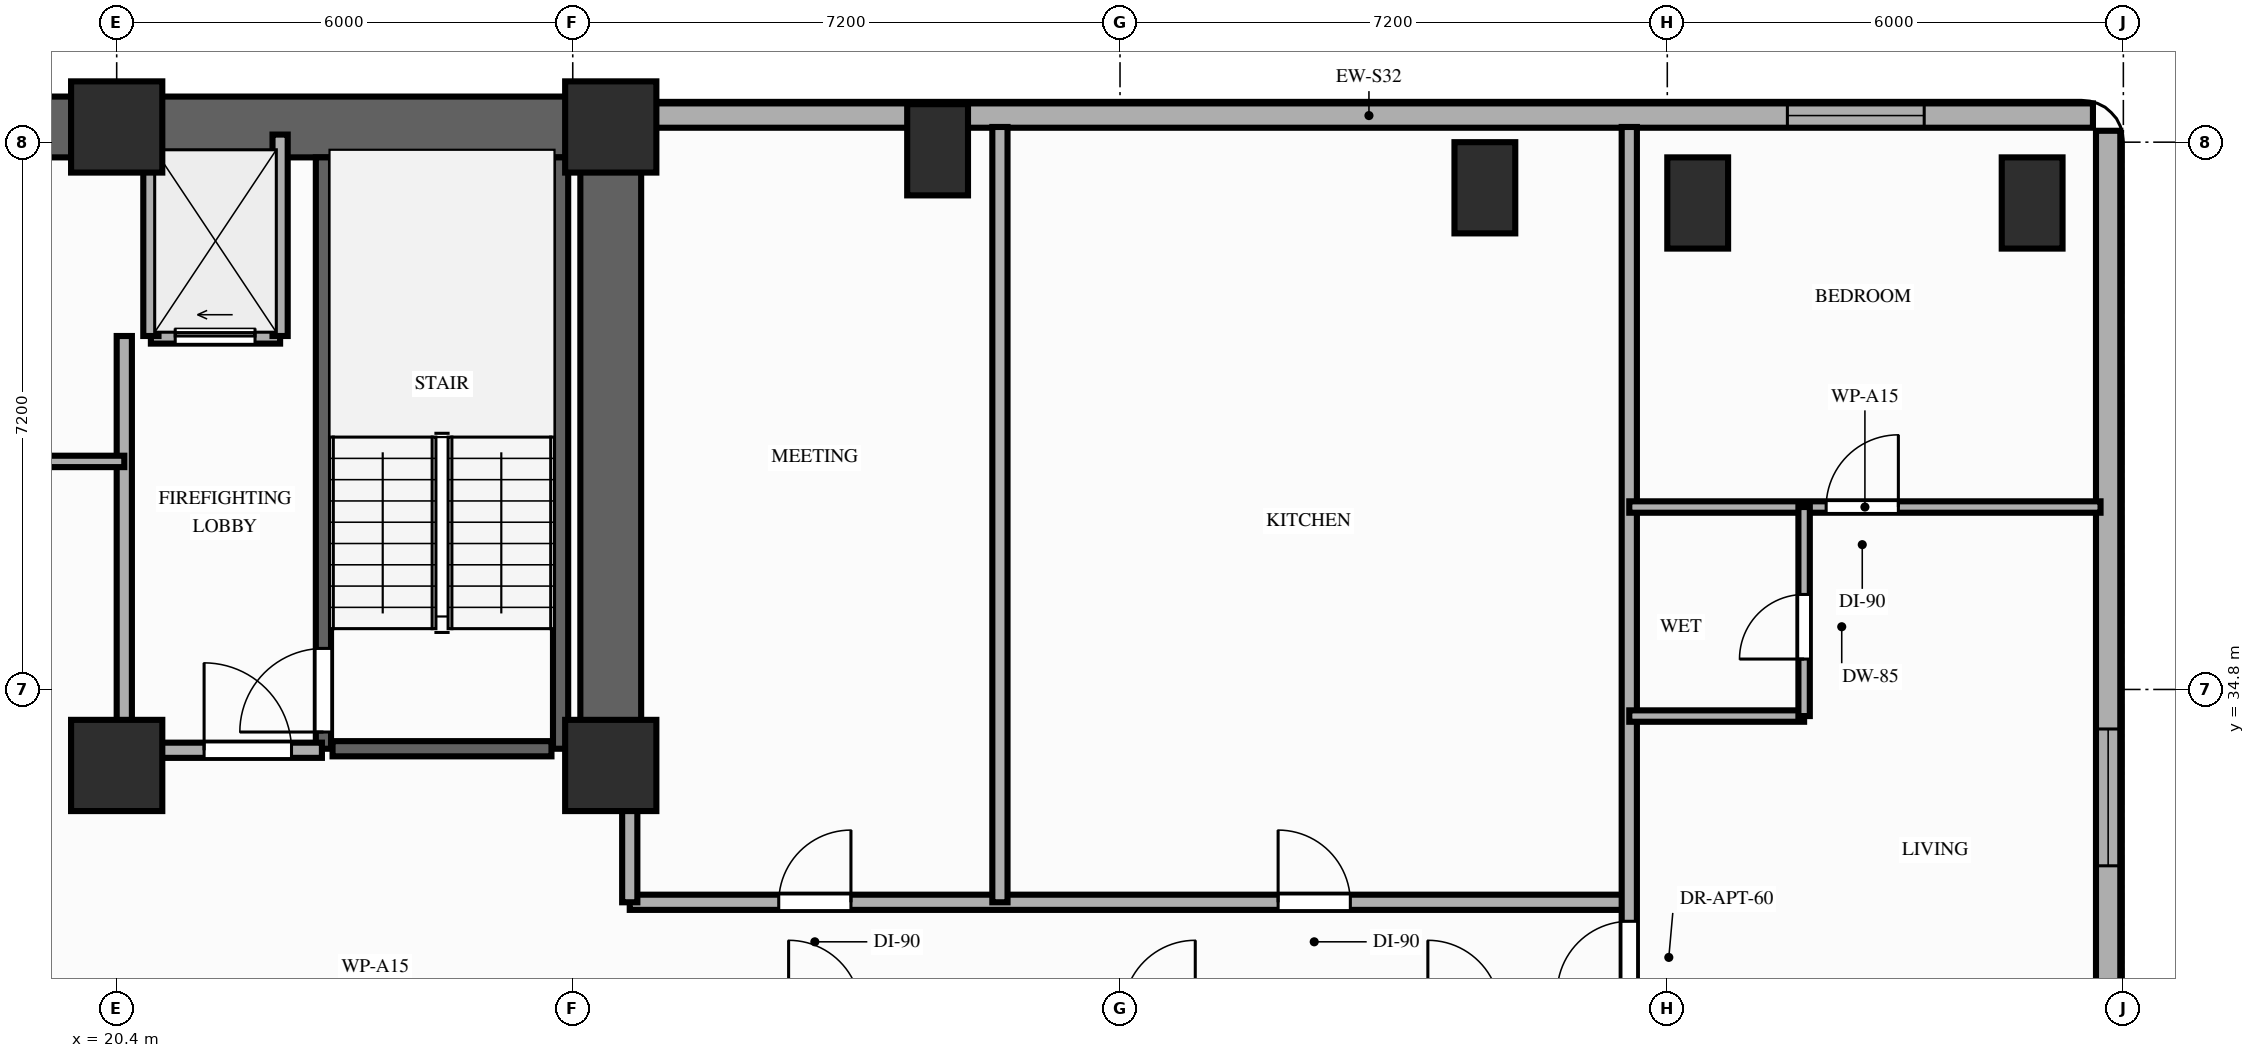
"""IFC4 building model, lengths in metres.
Left out: names, types, materials, properties, quantities, classifications, styles, units other than length and angle.
Written with IfcOpenShell. Run it as: python <this file> out.ifc"""

import sys

from ifc_helpers import new_model, si_unit, direction, frame, frame_2d, origin, origin_2d, place, context, subcontext, project, spatial, rectangle, extrude, element, fill, save


model = new_model("IFC4")
c1 = context("Model", 3, precision=1e-05, world=origin(), true_north=direction((0.0, 1.0)))
c2 = subcontext(c1, "Body", "Model", "MODEL_VIEW")
j1 = project(units=[si_unit("LENGTHUNIT", "METRE"), si_unit("PLANEANGLEUNIT", "RADIAN")], contexts=[c1])
p1 = place(None, origin())
s1 = spatial("IfcSite", under=j1, at=p1, CompositionType="ELEMENT")
p2 = place(p1, origin())
s2 = spatial("IfcBuilding", under=s1, at=p2, CompositionType="ELEMENT")
p3 = place(p2, frame((0.0, 0.0, 89.8)))
s3 = spatial("IfcBuildingStorey", under=s2, at=p3, CompositionType="ELEMENT", Elevation=89.8)
for number, where, z_axis, x_axis in (
    (1, (20.4, 33.8, 0.0), (0.0, 0.0, 1.0), (1.0, 0.0, 0.0)),
    (2, (26.9, 33.8, 0.0), (0.0, 0.0, 1.0), (1.0, 0.0, 0.0)),
    (3, (20.4, 42.2, 0.0), (0.0, 0.0, 1.0), (1.0, 0.0, 0.0)),
    (4, (26.9, 42.2, 0.0), (0.0, 0.0, 1.0), (1.0, 0.0, 0.0)),
):
    element("IfcColumn", number, at=place(p3, frame(where, z_axis=z_axis, x_axis=x_axis)), inside=s3, PredefinedType="COLUMN", context=c2, shape_type="SweptSolid", body=[
        extrude(rectangle(XDim=1.2, YDim=1.2, at=origin_2d()), origin(), (0.0, 0.0, 1.0), 3.2),
    ])
for number, where, z_axis, x_axis in (
    (5, (31.2, 41.9, 0.0), (0.0, 0.0, 1.0), (1.0, 0.0, 0.0)),
    (6, (38.4, 41.4, 0.0), (0.0, 0.0, 1.0), (1.0, 0.0, 0.0)),
    (7, (41.2, 41.2, 0.0), (0.0, 0.0, 1.0), (1.0, 0.0, 0.0)),
    (8, (45.6, 41.2, 0.0), (0.0, 0.0, 1.0), (1.0, 0.0, 0.0)),
):
    element("IfcColumn", number, at=place(p3, frame(where, z_axis=z_axis, x_axis=x_axis)), inside=s3, PredefinedType="COLUMN", context=c2, shape_type="SweptSolid", body=[
        extrude(rectangle(XDim=0.8, YDim=1.2, at=origin_2d()), origin(), (0.0, 0.0, 1.0), 3.2),
    ])
p4 = place(p3, frame((46.4, 42.35, 0.0), z_axis=(0.0, 0.0, 1.0), x_axis=(-1.0, 0.0, 0.0)))
e9 = element("IfcWall", 9, at=p4, inside=s3, PredefinedType="STANDARD", context=c2, shape_type="SweptSolid", body=[
    extrude(rectangle(XDim=19.05, YDim=0.32, at=frame_2d((9.525, 0.0))), origin(), (0.0, 0.0, 1.0), 2.4),
])
p5 = place(p4, frame((2.22, 0.0, 0.85)))
e10 = element("IfcOpeningElement", 10, at=p5, cuts=e9, PredefinedType="OPENING", context=c2, shape_type="SweptSolid", body=[
    extrude(rectangle(XDim=1.8, YDim=1.3, at=frame_2d((0.9, 0.65))), frame((0.0, 0.17, 0.0), z_axis=(0.0, -1.0, 0.0), x_axis=(1.0, 0.0, 0.0)), (0.0, 0.0, 1.0), 0.34),
])
p6 = place(p3, frame((46.6, 26.8, 0.0), z_axis=(0.0, 0.0, 1.0), x_axis=(0.0, 1.0, 0.0)))
e11 = element("IfcWall", 11, at=p6, inside=s3, PredefinedType="STANDARD", context=c2, shape_type="SweptSolid", body=[
    extrude(rectangle(XDim=15.35, YDim=0.32, at=frame_2d((7.675, 0.0))), origin(), (0.0, 0.0, 1.0), 3.02),
])
p7 = place(p6, frame((5.68, 0.0, 0.85)))
e12 = element("IfcOpeningElement", 12, at=p7, cuts=e11, PredefinedType="OPENING", context=c2, shape_type="SweptSolid", body=[
    extrude(rectangle(XDim=1.8, YDim=1.75, at=frame_2d((0.9, 0.875))), frame((0.0, 0.17, 0.0), z_axis=(0.0, -1.0, 0.0), x_axis=(1.0, 0.0, 0.0)), (0.0, 0.0, 1.0), 0.34),
])
p8 = place(p3, frame((6.45, 42.2, 0.0), z_axis=(0.0, 0.0, 1.0), x_axis=(1.0, 0.0, 0.0)))
e13 = element("IfcWall", 13, at=p8, inside=s3, PredefinedType="SHEAR", context=c2, shape_type="SweptSolid", body=[
    extrude(rectangle(XDim=20.45, YDim=0.8, at=frame_2d((10.225, 0.0))), origin(), (0.0, 0.0, 1.0), 3.02),
])
p9 = place(p3, frame((26.9, 33.8, 0.0), z_axis=(0.0, 0.0, 1.0), x_axis=(0.0, 1.0, 0.0)))
e14 = element("IfcWall", 14, at=p9, inside=s3, PredefinedType="SHEAR", context=c2, shape_type="SweptSolid", body=[
    extrude(rectangle(XDim=7.95, YDim=0.8, at=frame_2d((3.975, 0.0))), origin(), (0.0, 0.0, 1.0), 3.02),
])
p10 = place(p3, frame((23.12, 34.02, 0.0), z_axis=(0.0, 0.0, 1.0), x_axis=(0.0, 1.0, 0.0)))
e15 = element("IfcWall", 15, at=p10, inside=s3, PredefinedType="SHEAR", context=c2, shape_type="SweptSolid", body=[
    extrude(rectangle(XDim=7.78, YDim=0.2, at=frame_2d((3.89, 0.0))), origin(), (0.0, 0.0, 1.0), 3.02),
])
p11 = place(p10, frame((0.22, 0.0, 0.0)))
e16 = element("IfcOpeningElement", 16, at=p11, cuts=e15, PredefinedType="OPENING", context=c2, shape_type="SweptSolid", body=[
    extrude(rectangle(XDim=1.1, YDim=2.15, at=frame_2d((0.55, 1.075))), frame((0.0, 0.11, 0.0), z_axis=(0.0, -1.0, 0.0), x_axis=(1.0, 0.0, 0.0)), (0.0, 0.0, 1.0), 0.22),
])
p12 = place(p3, frame((26.24, 34.02, 0.0), z_axis=(0.0, 0.0, 1.0), x_axis=(0.0, 1.0, 0.0)))
e17 = element("IfcWall", 17, at=p12, inside=s3, PredefinedType="SHEAR", context=c2, shape_type="SweptSolid", body=[
    extrude(rectangle(XDim=7.78, YDim=0.2, at=frame_2d((3.89, 0.0))), origin(), (0.0, 0.0, 1.0), 3.02),
])
p13 = place(p3, frame((23.24, 34.02, 0.0), z_axis=(0.0, 0.0, 1.0), x_axis=(1.0, 0.0, 0.0)))
e18 = element("IfcWall", 18, at=p13, inside=s3, PredefinedType="SHEAR", context=c2, shape_type="SweptSolid", body=[
    extrude(rectangle(XDim=2.88, YDim=0.2, at=frame_2d((1.44, 0.0))), origin(), (0.0, 0.0, 1.0), 3.02),
])
p14 = place(p3, frame((20.85, 39.45, 0.0), z_axis=(0.0, 0.0, 1.0), x_axis=(1.0, 0.0, 0.0)))
e19 = element("IfcWall", 19, at=p14, inside=s3, PredefinedType="MOVABLE", context=c2, shape_type="SweptSolid", body=[
    extrude(rectangle(XDim=1.7, YDim=0.2, at=frame_2d((0.85, 0.0))), origin(), (0.0, 0.0, 1.0), 3.02),
])
p15 = place(p14, frame((0.32, 0.0, 0.0)))
e20 = element("IfcOpeningElement", 20, at=p15, cuts=e19, PredefinedType="OPENING", context=c2, shape_type="SweptSolid", body=[
    extrude(rectangle(XDim=1.05, YDim=2.15, at=frame_2d((0.525, 1.075))), frame((0.0, 0.11, 0.0), z_axis=(0.0, -1.0, 0.0), x_axis=(1.0, 0.0, 0.0)), (0.0, 0.0, 1.0), 0.22),
])
for number, where, z_axis, x_axis in (
    (21, (20.85, 39.45, 0.0), (0.0, 0.0, 1.0), (0.0, 1.0, 0.0)),
    (22, (22.55, 39.45, 0.0), (0.0, 0.0, 1.0), (0.0, 1.0, 0.0)),
):
    element("IfcWall", number, at=place(p3, frame(where, z_axis=z_axis, x_axis=x_axis)), inside=s3, PredefinedType="MOVABLE", context=c2, shape_type="SweptSolid", body=[
        extrude(rectangle(XDim=2.65, YDim=0.2, at=frame_2d((1.325, 0.0))), origin(), (0.0, 0.0, 1.0), 2.4),
    ])
p16 = place(p3, frame((20.5, 34.0, 0.0), z_axis=(0.0, 0.0, 1.0), x_axis=(0.0, 1.0, 0.0)))
e23 = element("IfcWall", 23, at=p16, inside=s3, PredefinedType="PARTITIONING", context=c2, shape_type="SweptSolid", body=[
    extrude(rectangle(XDim=5.45, YDim=0.2, at=frame_2d((2.725, 0.0))), origin(), (0.0, 0.0, 1.0), 2.4),
])
p17 = place(p3, frame((20.5, 34.0, 0.0), z_axis=(0.0, 0.0, 1.0), x_axis=(1.0, 0.0, 0.0)))
e24 = element("IfcWall", 24, at=p17, inside=s3, PredefinedType="PARTITIONING", context=c2, shape_type="SweptSolid", body=[
    extrude(rectangle(XDim=2.6, YDim=0.2, at=frame_2d((1.3, 0.0))), origin(), (0.0, 0.0, 1.0), 2.4),
])
p18 = place(p17, frame((1.05, 0.0, 0.0)))
e25 = element("IfcOpeningElement", 25, at=p18, cuts=e24, PredefinedType="OPENING", context=c2, shape_type="SweptSolid", body=[
    extrude(rectangle(XDim=1.15, YDim=2.15, at=frame_2d((0.575, 1.075))), frame((0.0, 0.11, 0.0), z_axis=(0.0, -1.0, 0.0), x_axis=(1.0, 0.0, 0.0)), (0.0, 0.0, 1.0), 0.22),
])
p19 = place(p3, frame((12.9, 37.8, 0.0), z_axis=(0.0, 0.0, 1.0), x_axis=(1.0, 0.0, 0.0)))
e26 = element("IfcWall", 26, at=p19, inside=s3, PredefinedType="PARTITIONING", context=c2, shape_type="SweptSolid", body=[
    extrude(rectangle(XDim=7.6, YDim=0.15, at=frame_2d((3.8, 0.0))), origin(), (0.0, 0.0, 1.0), 3.02),
])
p20 = place(p19, frame((1.3, 0.0, 0.0)))
e27 = element("IfcOpeningElement", 27, at=p20, cuts=e26, PredefinedType="OPENING", context=c2, shape_type="SweptSolid", body=[
    extrude(rectangle(XDim=0.95, YDim=2.15, at=frame_2d((0.475, 1.075))), frame((0.0, 0.085, 0.0), z_axis=(0.0, -1.0, 0.0), x_axis=(1.0, 0.0, 0.0)), (0.0, 0.0, 1.0), 0.17),
])
p21 = place(p19, frame((5.1, 0.0, 0.0)))
e28 = element("IfcOpeningElement", 28, at=p21, cuts=e26, PredefinedType="OPENING", context=c2, shape_type="SweptSolid", body=[
    extrude(rectangle(XDim=0.95, YDim=2.15, at=frame_2d((0.475, 1.075))), frame((0.0, 0.085, 0.0), z_axis=(0.0, -1.0, 0.0), x_axis=(1.0, 0.0, 0.0)), (0.0, 0.0, 1.0), 0.17),
])
p22 = place(p3, frame((27.15, 32.0, 0.0), z_axis=(0.0, 0.0, 1.0), x_axis=(1.0, 0.0, 0.0)))
e29 = element("IfcWall", 29, at=p22, inside=s3, PredefinedType="PARTITIONING", context=c2, shape_type="SweptSolid", body=[
    extrude(rectangle(XDim=13.15, YDim=0.2, at=frame_2d((6.575, 0.0))), origin(), (0.0, 0.0, 1.0), 2.4),
])
p23 = place(p22, frame((1.96, 0.0, 0.0)))
e30 = element("IfcOpeningElement", 30, at=p23, cuts=e29, PredefinedType="OPENING", context=c2, shape_type="SweptSolid", body=[
    extrude(rectangle(XDim=0.95, YDim=2.15, at=frame_2d((0.475, 1.075))), frame((0.0, 0.11, 0.0), z_axis=(0.0, -1.0, 0.0), x_axis=(1.0, 0.0, 0.0)), (0.0, 0.0, 1.0), 0.22),
])
p24 = place(p22, frame((8.53, 0.0, 0.0)))
e31 = element("IfcOpeningElement", 31, at=p24, cuts=e29, PredefinedType="OPENING", context=c2, shape_type="SweptSolid", body=[
    extrude(rectangle(XDim=0.95, YDim=2.15, at=frame_2d((0.475, 1.075))), frame((0.0, 0.11, 0.0), z_axis=(0.0, -1.0, 0.0), x_axis=(1.0, 0.0, 0.0)), (0.0, 0.0, 1.0), 0.22),
])
p25 = place(p3, frame((27.15, 32.0, 0.0), z_axis=(0.0, 0.0, 1.0), x_axis=(0.0, 1.0, 0.0)))
e32 = element("IfcWall", 32, at=p25, inside=s3, PredefinedType="PARTITIONING", context=c2, shape_type="SweptSolid", body=[
    extrude(rectangle(XDim=1.68, YDim=0.2, at=frame_2d((0.84, 0.0))), origin(), (0.0, 0.0, 1.0), 2.4),
])
p26 = place(p3, frame((40.3, 26.75, 0.0), z_axis=(0.0, 0.0, 1.0), x_axis=(0.0, 1.0, 0.0)))
e33 = element("IfcWall", 33, at=p26, inside=s3, PredefinedType="PARTITIONING", context=c2, shape_type="SweptSolid", body=[
    extrude(rectangle(XDim=15.45, YDim=0.2, at=frame_2d((7.725, 0.0))), origin(), (0.0, 0.0, 1.0), 2.4),
])
p27 = place(p26, frame((4.05, 0.0, 0.0)))
e34 = element("IfcOpeningElement", 34, at=p27, cuts=e33, PredefinedType="OPENING", context=c2, shape_type="SweptSolid", body=[
    extrude(rectangle(XDim=0.95, YDim=2.15, at=frame_2d((0.475, 1.075))), frame((0.0, 0.11, 0.0), z_axis=(0.0, -1.0, 0.0), x_axis=(1.0, 0.0, 0.0)), (0.0, 0.0, 1.0), 0.22),
])
p28 = place(p3, frame((40.3, 37.2, 0.0), z_axis=(0.0, 0.0, 1.0), x_axis=(1.0, 0.0, 0.0)))
e35 = element("IfcWall", 35, at=p28, inside=s3, PredefinedType="PARTITIONING", context=c2, shape_type="SweptSolid", body=[
    extrude(rectangle(XDim=6.2, YDim=0.15, at=frame_2d((3.1, 0.0))), origin(), (0.0, 0.0, 1.0), 2.4),
])
p29 = place(p28, frame((2.59, 0.0, 0.0)))
e36 = element("IfcOpeningElement", 36, at=p29, cuts=e35, PredefinedType="OPENING", context=c2, shape_type="SweptSolid", body=[
    extrude(rectangle(XDim=0.95, YDim=2.15, at=frame_2d((0.475, 1.075))), frame((0.0, 0.085, 0.0), z_axis=(0.0, -1.0, 0.0), x_axis=(1.0, 0.0, 0.0)), (0.0, 0.0, 1.0), 0.17),
])
p30 = place(p3, frame((40.3, 34.45, 0.0), z_axis=(0.0, 0.0, 1.0), x_axis=(1.0, 0.0, 0.0)))
e37 = element("IfcWall", 37, at=p30, inside=s3, PredefinedType="PARTITIONING", context=c2, shape_type="SweptSolid", body=[
    extrude(rectangle(XDim=2.3, YDim=0.15, at=frame_2d((1.15, 0.0))), origin(), (0.0, 0.0, 1.0), 2.4),
])
p31 = place(p3, frame((42.6, 34.45, 0.0), z_axis=(0.0, 0.0, 1.0), x_axis=(0.0, 1.0, 0.0)))
e38 = element("IfcWall", 38, at=p31, inside=s3, PredefinedType="PARTITIONING", context=c2, shape_type="SweptSolid", body=[
    extrude(rectangle(XDim=2.75, YDim=0.15, at=frame_2d((1.375, 0.0))), origin(), (0.0, 0.0, 1.0), 2.61),
])
p32 = place(p31, frame((0.75, 0.0, 0.0)))
e39 = element("IfcOpeningElement", 39, at=p32, cuts=e38, PredefinedType="OPENING", context=c2, shape_type="SweptSolid", body=[
    extrude(rectangle(XDim=0.85, YDim=2.1, at=frame_2d((0.425, 1.05))), frame((0.0, 0.085, 0.0), z_axis=(0.0, -1.0, 0.0), x_axis=(1.0, 0.0, 0.0)), (0.0, 0.0, 1.0), 0.17),
])
p33 = place(p3, frame((32.02, 32.0, 0.0), z_axis=(0.0, 0.0, 1.0), x_axis=(0.0, 1.0, 0.0)))
e40 = element("IfcWall", 40, at=p33, inside=s3, PredefinedType="PARTITIONING", context=c2, shape_type="SweptSolid", body=[
    extrude(rectangle(XDim=10.2, YDim=0.2, at=frame_2d((5.1, 0.0))), origin(), (0.0, 0.0, 1.0), 2.4),
])
p34 = place(p7, origin())
e41 = element("IfcWindow", 41, at=p34, inside=s3, PartitioningType="SINGLE_PANEL", PredefinedType="WINDOW", context=c2, shape_type="SweptSolid", body=[
    extrude(rectangle(XDim=1.8, YDim=1.75, at=frame_2d((0.9, 0.875))), frame((0.0, 0.03, 0.0), z_axis=(0.0, -1.0, 0.0), x_axis=(1.0, 0.0, 0.0)), (0.0, 0.0, 1.0), 0.06),
])
fill(e12, e41)
p35 = place(p5, origin())
e42 = element("IfcWindow", 42, at=p35, inside=s3, PartitioningType="SINGLE_PANEL", PredefinedType="WINDOW", context=c2, shape_type="SweptSolid", body=[
    extrude(rectangle(XDim=1.8, YDim=1.3, at=frame_2d((0.9, 0.65))), frame((0.0, 0.03, 0.0), z_axis=(0.0, -1.0, 0.0), x_axis=(1.0, 0.0, 0.0)), (0.0, 0.0, 1.0), 0.06),
])
fill(e10, e42)
p36 = place(p11, origin())
e43 = element("IfcDoor", 43, at=p36, inside=s3, OperationType="SINGLE_SWING_LEFT", PredefinedType="DOOR", context=c2, shape_type="SweptSolid", body=[
    extrude(rectangle(XDim=1.1, YDim=2.15, at=frame_2d((0.55, 1.075))), frame((0.0, 0.025, 0.0), z_axis=(0.0, -1.0, 0.0), x_axis=(1.0, 0.0, 0.0)), (0.0, 0.0, 1.0), 0.05),
])
fill(e16, e43)
p37 = place(p15, origin())
e44 = element("IfcDoor", 44, at=p37, inside=s3, OperationType="SLIDING_TO_LEFT", PredefinedType="DOOR", context=c2, shape_type="SweptSolid", body=[
    extrude(rectangle(XDim=1.05, YDim=2.15, at=frame_2d((0.525, 1.075))), frame((0.0, 0.025, 0.0), z_axis=(0.0, -1.0, 0.0), x_axis=(1.0, 0.0, 0.0)), (0.0, 0.0, 1.0), 0.05),
])
fill(e20, e44)
p38 = place(p18, origin())
e45 = element("IfcDoor", 45, at=p38, inside=s3, OperationType="SINGLE_SWING_LEFT", PredefinedType="DOOR", context=c2, shape_type="SweptSolid", body=[
    extrude(rectangle(XDim=1.15, YDim=2.15, at=frame_2d((0.575, 1.075))), frame((0.0, 0.025, 0.0), z_axis=(0.0, -1.0, 0.0), x_axis=(1.0, 0.0, 0.0)), (0.0, 0.0, 1.0), 0.05),
])
fill(e25, e45)
p39 = place(p27, origin())
e46 = element("IfcDoor", 46, at=p39, inside=s3, OperationType="SINGLE_SWING_LEFT", PredefinedType="DOOR", context=c2, shape_type="SweptSolid", body=[
    extrude(rectangle(XDim=0.95, YDim=2.15, at=frame_2d((0.475, 1.075))), frame((0.0, 0.025, 0.0), z_axis=(0.0, -1.0, 0.0), x_axis=(1.0, 0.0, 0.0)), (0.0, 0.0, 1.0), 0.05),
])
fill(e34, e46)
p40 = place(p29, origin())
e47 = element("IfcDoor", 47, at=p40, inside=s3, OperationType="SINGLE_SWING_RIGHT", PredefinedType="DOOR", context=c2, shape_type="SweptSolid", body=[
    extrude(rectangle(XDim=0.95, YDim=2.15, at=frame_2d((0.475, 1.075))), frame((0.0, 0.025, 0.0), z_axis=(0.0, -1.0, 0.0), x_axis=(1.0, 0.0, 0.0)), (0.0, 0.0, 1.0), 0.05),
])
fill(e36, e47)
p41 = place(p32, origin())
e48 = element("IfcDoor", 48, at=p41, inside=s3, OperationType="SINGLE_SWING_LEFT", PredefinedType="DOOR", context=c2, shape_type="SweptSolid", body=[
    extrude(rectangle(XDim=0.85, YDim=2.1, at=frame_2d((0.425, 1.05))), frame((0.0, 0.025, 0.0), z_axis=(0.0, -1.0, 0.0), x_axis=(1.0, 0.0, 0.0)), (0.0, 0.0, 1.0), 0.05),
])
fill(e39, e48)
p42 = place(p23, origin())
e49 = element("IfcDoor", 49, at=p42, inside=s3, OperationType="SINGLE_SWING_RIGHT", PredefinedType="DOOR", context=c2, shape_type="SweptSolid", body=[
    extrude(rectangle(XDim=0.95, YDim=2.15, at=frame_2d((0.475, 1.075))), frame((0.0, 0.025, 0.0), z_axis=(0.0, -1.0, 0.0), x_axis=(1.0, 0.0, 0.0)), (0.0, 0.0, 1.0), 0.05),
])
fill(e30, e49)
p43 = place(p24, origin())
e50 = element("IfcDoor", 50, at=p43, inside=s3, OperationType="SINGLE_SWING_LEFT", PredefinedType="DOOR", context=c2, shape_type="SweptSolid", body=[
    extrude(rectangle(XDim=0.95, YDim=2.15, at=frame_2d((0.475, 1.075))), frame((0.0, 0.025, 0.0), z_axis=(0.0, -1.0, 0.0), x_axis=(1.0, 0.0, 0.0)), (0.0, 0.0, 1.0), 0.05),
])
fill(e31, e50)
save(model, sys.argv[1])
